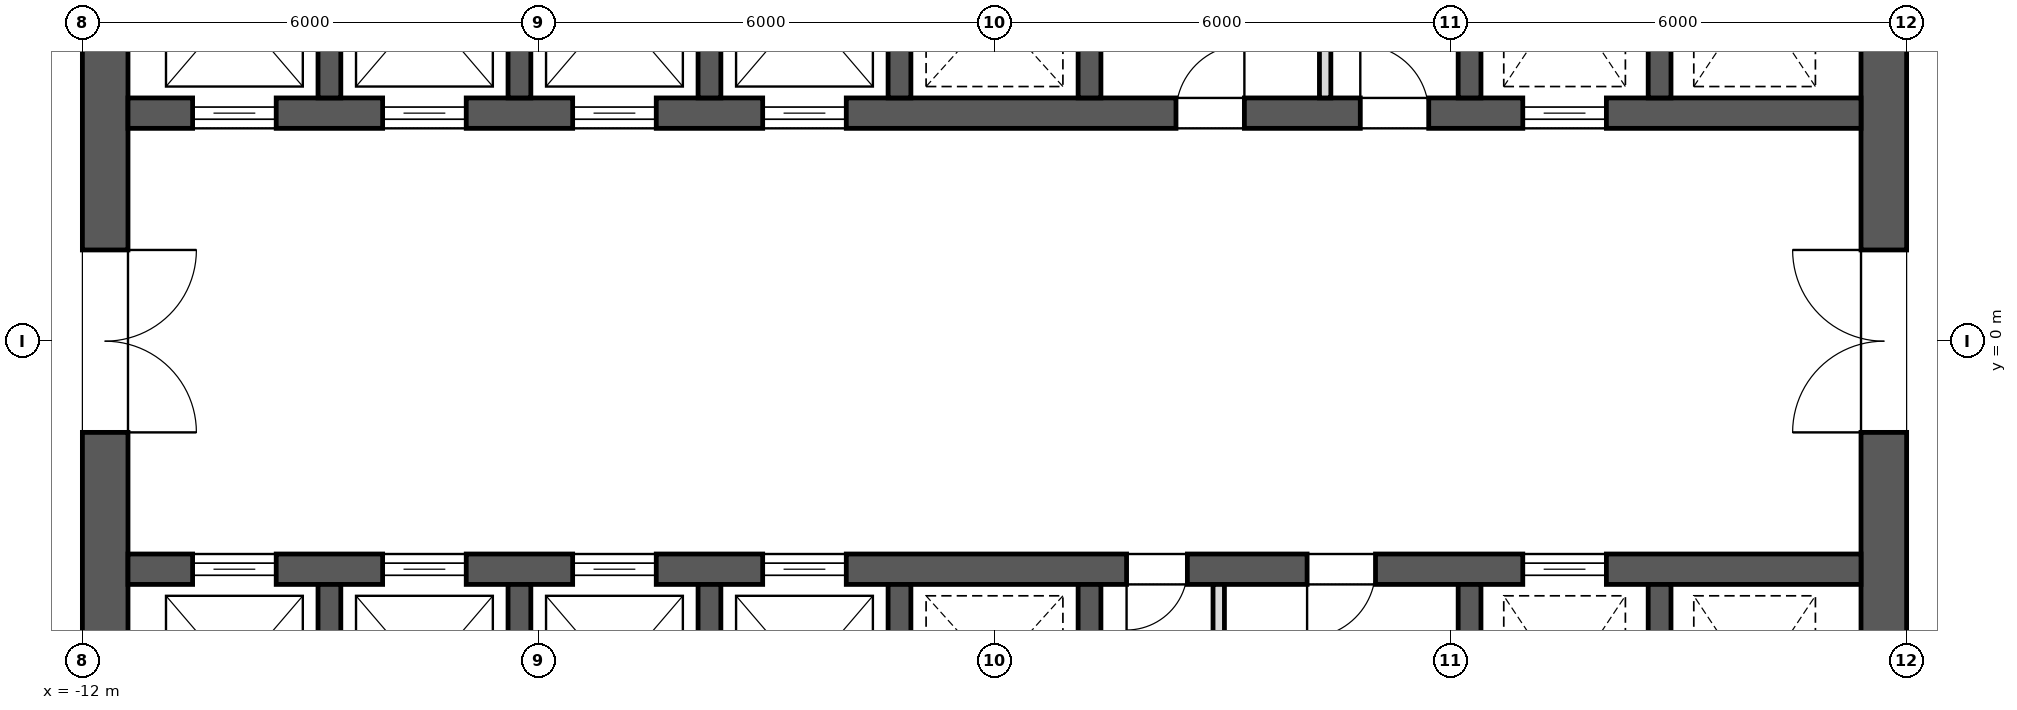
"""IFC4 building model, lengths in metres.
Left out: names, types, materials, properties, quantities, classifications, styles, units other than length and angle.
Written with IfcOpenShell. Run it as: python <this file> out.ifc"""

import sys

from ifc_helpers import new_model, si_unit, direction, frame, frame_2d, origin, place, context, subcontext, project, spatial, rectangle, extrude, element, fill, save


model = new_model("IFC4")
c1 = context("Model", 3, precision=1e-05, world=origin(), true_north=direction((0.0, 1.0)))
c2 = subcontext(c1, "Body", "Model", "MODEL_VIEW")
j1 = project(units=[si_unit("LENGTHUNIT", "METRE"), si_unit("PLANEANGLEUNIT", "RADIAN")], contexts=[c1])
p1 = place(None, origin())
s1 = spatial("IfcSite", under=j1, at=p1, CompositionType="ELEMENT")
p2 = place(p1, origin())
s2 = spatial("IfcBuilding", under=s1, at=p2, CompositionType="ELEMENT")
p3 = place(p2, frame((0.0, 0.0, 238.9)))
s3 = spatial("IfcBuildingStorey", under=s2, at=p3, CompositionType="ELEMENT", Elevation=238.9)
p4 = place(p3, frame((11.7, -11.4, 0.0), z_axis=(0.0, 0.0, 1.0), x_axis=(0.0, 1.0, 0.0)))
e1 = element("IfcWall", 1, at=p4, inside=s3, PredefinedType="SHEAR", context=c2, shape_type="SweptSolid", body=[
    extrude(rectangle(XDim=22.8, YDim=0.6, at=frame_2d((11.4, 0.0))), origin(), (0.0, 0.0, 1.0), 4.0),
])
p5 = place(p4, frame((10.2, 0.0, 0.0)))
e2 = element("IfcOpeningElement", 2, at=p5, cuts=e1, PredefinedType="OPENING", context=c2, shape_type="SweptSolid", body=[
    extrude(rectangle(XDim=2.4, YDim=2.1, at=frame_2d((1.2, 1.05))), frame((0.0, 0.312, 0.0), z_axis=(0.0, -1.0, 0.0), x_axis=(1.0, 0.0, 0.0)), (0.0, 0.0, 1.0), 0.624),
])
p6 = place(p4, frame((19.5, 0.0, 0.0)))
e3 = element("IfcOpeningElement", 3, at=p6, cuts=e1, PredefinedType="OPENING", context=c2, shape_type="SweptSolid", body=[
    extrude(rectangle(XDim=1.2, YDim=2.1, at=frame_2d((0.6, 1.05))), frame((0.0, 0.312, 0.0), z_axis=(0.0, -1.0, 0.0), x_axis=(1.0, 0.0, 0.0)), (0.0, 0.0, 1.0), 0.624),
])
p7 = place(p4, frame((2.1, 0.0, 0.0)))
e4 = element("IfcOpeningElement", 4, at=p7, cuts=e1, PredefinedType="OPENING", context=c2, shape_type="SweptSolid", body=[
    extrude(rectangle(XDim=1.2, YDim=2.1, at=frame_2d((0.6, 1.05))), frame((0.0, 0.312, 0.0), z_axis=(0.0, -1.0, 0.0), x_axis=(1.0, 0.0, 0.0)), (0.0, 0.0, 1.0), 0.624),
])
p8 = place(p3, frame((-11.7, -11.4, 0.0), z_axis=(0.0, 0.0, 1.0), x_axis=(0.0, 1.0, 0.0)))
e5 = element("IfcWall", 5, at=p8, inside=s3, PredefinedType="SHEAR", context=c2, shape_type="SweptSolid", body=[
    extrude(rectangle(XDim=22.8, YDim=0.6, at=frame_2d((11.4, 0.0))), origin(), (0.0, 0.0, 1.0), 4.0),
])
p9 = place(p8, frame((10.2, 0.0, 0.0)))
e6 = element("IfcOpeningElement", 6, at=p9, cuts=e5, PredefinedType="OPENING", context=c2, shape_type="SweptSolid", body=[
    extrude(rectangle(XDim=2.4, YDim=2.1, at=frame_2d((1.2, 1.05))), frame((0.0, 0.312, 0.0), z_axis=(0.0, -1.0, 0.0), x_axis=(1.0, 0.0, 0.0)), (0.0, 0.0, 1.0), 0.624),
])
p10 = place(p8, frame((18.925, 0.0, 0.0)))
e7 = element("IfcOpeningElement", 7, at=p10, cuts=e5, PredefinedType="OPENING", context=c2, shape_type="SweptSolid", body=[
    extrude(rectangle(XDim=1.2, YDim=2.1, at=frame_2d((0.6, 1.05))), frame((0.0, 0.312, 0.0), z_axis=(0.0, -1.0, 0.0), x_axis=(1.0, 0.0, 0.0)), (0.0, 0.0, 1.0), 0.624),
])
p11 = place(p8, frame((2.675, 0.0, 0.0)))
e8 = element("IfcOpeningElement", 8, at=p11, cuts=e5, PredefinedType="OPENING", context=c2, shape_type="SweptSolid", body=[
    extrude(rectangle(XDim=1.2, YDim=2.1, at=frame_2d((0.6, 1.05))), frame((0.0, 0.312, 0.0), z_axis=(0.0, -1.0, 0.0), x_axis=(1.0, 0.0, 0.0)), (0.0, 0.0, 1.0), 0.624),
])
p12 = place(p3, frame((-11.4, 3.0, 0.0), z_axis=(0.0, 0.0, 1.0), x_axis=(1.0, 0.0, 0.0)))
e9 = element("IfcWall", 9, at=p12, inside=s3, PredefinedType="SHEAR", context=c2, shape_type="SweptSolid", body=[
    extrude(rectangle(XDim=22.8, YDim=0.4, at=frame_2d((11.4, 0.0))), origin(), (0.0, 0.0, 1.0), 4.0),
])
p13 = place(p12, frame((0.85, 0.0, 0.0)))
e10 = element("IfcOpeningElement", 10, at=p13, cuts=e9, PredefinedType="OPENING", context=c2, shape_type="SweptSolid", body=[
    extrude(rectangle(XDim=1.1, YDim=2.1, at=frame_2d((0.55, 1.05))), frame((0.0, 0.212, 0.0), z_axis=(0.0, -1.0, 0.0), x_axis=(1.0, 0.0, 0.0)), (0.0, 0.0, 1.0), 0.424),
])
p14 = place(p12, frame((3.35, 0.0, 0.0)))
e11 = element("IfcOpeningElement", 11, at=p14, cuts=e9, PredefinedType="OPENING", context=c2, shape_type="SweptSolid", body=[
    extrude(rectangle(XDim=1.1, YDim=2.1, at=frame_2d((0.55, 1.05))), frame((0.0, 0.212, 0.0), z_axis=(0.0, -1.0, 0.0), x_axis=(1.0, 0.0, 0.0)), (0.0, 0.0, 1.0), 0.424),
])
p15 = place(p12, frame((5.85, 0.0, 0.0)))
e12 = element("IfcOpeningElement", 12, at=p15, cuts=e9, PredefinedType="OPENING", context=c2, shape_type="SweptSolid", body=[
    extrude(rectangle(XDim=1.1, YDim=2.1, at=frame_2d((0.55, 1.05))), frame((0.0, 0.212, 0.0), z_axis=(0.0, -1.0, 0.0), x_axis=(1.0, 0.0, 0.0)), (0.0, 0.0, 1.0), 0.424),
])
p16 = place(p12, frame((8.35, 0.0, 0.0)))
e13 = element("IfcOpeningElement", 13, at=p16, cuts=e9, PredefinedType="OPENING", context=c2, shape_type="SweptSolid", body=[
    extrude(rectangle(XDim=1.1, YDim=2.1, at=frame_2d((0.55, 1.05))), frame((0.0, 0.212, 0.0), z_axis=(0.0, -1.0, 0.0), x_axis=(1.0, 0.0, 0.0)), (0.0, 0.0, 1.0), 0.424),
])
p17 = place(p12, frame((18.35, 0.0, 0.0)))
e14 = element("IfcOpeningElement", 14, at=p17, cuts=e9, PredefinedType="OPENING", context=c2, shape_type="SweptSolid", body=[
    extrude(rectangle(XDim=1.1, YDim=2.1, at=frame_2d((0.55, 1.05))), frame((0.0, 0.212, 0.0), z_axis=(0.0, -1.0, 0.0), x_axis=(1.0, 0.0, 0.0)), (0.0, 0.0, 1.0), 0.424),
])
p18 = place(p12, frame((13.788, 0.0, 0.0)))
e15 = element("IfcOpeningElement", 15, at=p18, cuts=e9, PredefinedType="OPENING", context=c2, shape_type="SweptSolid", body=[
    extrude(rectangle(XDim=0.9, YDim=2.1, at=frame_2d((0.45, 1.05))), frame((0.0, 0.212, 0.0), z_axis=(0.0, -1.0, 0.0), x_axis=(1.0, 0.0, 0.0)), (0.0, 0.0, 1.0), 0.424),
])
p19 = place(p12, frame((16.212, 0.0, 0.0)))
e16 = element("IfcOpeningElement", 16, at=p19, cuts=e9, PredefinedType="OPENING", context=c2, shape_type="SweptSolid", body=[
    extrude(rectangle(XDim=0.9, YDim=2.1, at=frame_2d((0.45, 1.05))), frame((0.0, 0.212, 0.0), z_axis=(0.0, -1.0, 0.0), x_axis=(1.0, 0.0, 0.0)), (0.0, 0.0, 1.0), 0.424),
])
for number, where, z_axis, x_axis in (
    (17, (-8.75, 3.2, 0.0), (0.0, 0.0, 1.0), (0.0, 1.0, 0.0)),
    (18, (-6.25, 3.2, 0.0), (0.0, 0.0, 1.0), (0.0, 1.0, 0.0)),
    (19, (-3.75, 3.2, 0.0), (0.0, 0.0, 1.0), (0.0, 1.0, 0.0)),
    (20, (-1.25, 3.2, 0.0), (0.0, 0.0, 1.0), (0.0, 1.0, 0.0)),
    (21, (1.25, 3.2, 0.0), (0.0, 0.0, 1.0), (0.0, 1.0, 0.0)),
    (22, (6.25, 3.2, 0.0), (0.0, 0.0, 1.0), (0.0, 1.0, 0.0)),
    (23, (8.75, 3.2, 0.0), (0.0, 0.0, 1.0), (0.0, 1.0, 0.0)),
):
    element("IfcWall", number, at=place(p3, frame(where, z_axis=z_axis, x_axis=x_axis)), inside=s3, PredefinedType="SHEAR", context=c2, shape_type="SweptSolid", body=[
        extrude(rectangle(XDim=2.9, YDim=0.3, at=frame_2d((1.45, 0.0))), origin(), (0.0, 0.0, 1.0), 4.0),
    ])
p20 = place(p3, frame((-11.4, -3.0, 0.0), z_axis=(0.0, 0.0, 1.0), x_axis=(1.0, 0.0, 0.0)))
e24 = element("IfcWall", 24, at=p20, inside=s3, PredefinedType="SHEAR", context=c2, shape_type="SweptSolid", body=[
    extrude(rectangle(XDim=22.8, YDim=0.4, at=frame_2d((11.4, 0.0))), origin(), (0.0, 0.0, 1.0), 4.0),
])
p21 = place(p20, frame((0.85, 0.0, 0.0)))
e25 = element("IfcOpeningElement", 25, at=p21, cuts=e24, PredefinedType="OPENING", context=c2, shape_type="SweptSolid", body=[
    extrude(rectangle(XDim=1.1, YDim=2.1, at=frame_2d((0.55, 1.05))), frame((0.0, 0.212, 0.0), z_axis=(0.0, -1.0, 0.0), x_axis=(1.0, 0.0, 0.0)), (0.0, 0.0, 1.0), 0.424),
])
p22 = place(p20, frame((3.35, 0.0, 0.0)))
e26 = element("IfcOpeningElement", 26, at=p22, cuts=e24, PredefinedType="OPENING", context=c2, shape_type="SweptSolid", body=[
    extrude(rectangle(XDim=1.1, YDim=2.1, at=frame_2d((0.55, 1.05))), frame((0.0, 0.212, 0.0), z_axis=(0.0, -1.0, 0.0), x_axis=(1.0, 0.0, 0.0)), (0.0, 0.0, 1.0), 0.424),
])
p23 = place(p20, frame((5.85, 0.0, 0.0)))
e27 = element("IfcOpeningElement", 27, at=p23, cuts=e24, PredefinedType="OPENING", context=c2, shape_type="SweptSolid", body=[
    extrude(rectangle(XDim=1.1, YDim=2.1, at=frame_2d((0.55, 1.05))), frame((0.0, 0.212, 0.0), z_axis=(0.0, -1.0, 0.0), x_axis=(1.0, 0.0, 0.0)), (0.0, 0.0, 1.0), 0.424),
])
p24 = place(p20, frame((8.35, 0.0, 0.0)))
e28 = element("IfcOpeningElement", 28, at=p24, cuts=e24, PredefinedType="OPENING", context=c2, shape_type="SweptSolid", body=[
    extrude(rectangle(XDim=1.1, YDim=2.1, at=frame_2d((0.55, 1.05))), frame((0.0, 0.212, 0.0), z_axis=(0.0, -1.0, 0.0), x_axis=(1.0, 0.0, 0.0)), (0.0, 0.0, 1.0), 0.424),
])
p25 = place(p20, frame((18.35, 0.0, 0.0)))
e29 = element("IfcOpeningElement", 29, at=p25, cuts=e24, PredefinedType="OPENING", context=c2, shape_type="SweptSolid", body=[
    extrude(rectangle(XDim=1.1, YDim=2.1, at=frame_2d((0.55, 1.05))), frame((0.0, 0.212, 0.0), z_axis=(0.0, -1.0, 0.0), x_axis=(1.0, 0.0, 0.0)), (0.0, 0.0, 1.0), 0.424),
])
p26 = place(p20, frame((13.137, 0.0, 0.0)))
e30 = element("IfcOpeningElement", 30, at=p26, cuts=e24, PredefinedType="OPENING", context=c2, shape_type="SweptSolid", body=[
    extrude(rectangle(XDim=0.8, YDim=2.1, at=frame_2d((0.4, 1.05))), frame((0.0, 0.212, 0.0), z_axis=(0.0, -1.0, 0.0), x_axis=(1.0, 0.0, 0.0)), (0.0, 0.0, 1.0), 0.424),
])
p27 = place(p20, frame((15.512, 0.0, 0.0)))
e31 = element("IfcOpeningElement", 31, at=p27, cuts=e24, PredefinedType="OPENING", context=c2, shape_type="SweptSolid", body=[
    extrude(rectangle(XDim=0.9, YDim=2.1, at=frame_2d((0.45, 1.05))), frame((0.0, 0.212, 0.0), z_axis=(0.0, -1.0, 0.0), x_axis=(1.0, 0.0, 0.0)), (0.0, 0.0, 1.0), 0.424),
])
for number, where, z_axis, x_axis in (
    (32, (-8.75, -6.1, 0.0), (0.0, 0.0, 1.0), (0.0, 1.0, 0.0)),
    (33, (-6.25, -6.1, 0.0), (0.0, 0.0, 1.0), (0.0, 1.0, 0.0)),
    (34, (-3.75, -6.1, 0.0), (0.0, 0.0, 1.0), (0.0, 1.0, 0.0)),
    (35, (-1.25, -6.1, 0.0), (0.0, 0.0, 1.0), (0.0, 1.0, 0.0)),
    (36, (1.25, -6.1, 0.0), (0.0, 0.0, 1.0), (0.0, 1.0, 0.0)),
    (37, (6.25, -6.1, 0.0), (0.0, 0.0, 1.0), (0.0, 1.0, 0.0)),
    (38, (8.75, -6.1, 0.0), (0.0, 0.0, 1.0), (0.0, 1.0, 0.0)),
):
    element("IfcWall", number, at=place(p3, frame(where, z_axis=z_axis, x_axis=x_axis)), inside=s3, PredefinedType="SHEAR", context=c2, shape_type="SweptSolid", body=[
        extrude(rectangle(XDim=2.9, YDim=0.3, at=frame_2d((1.45, 0.0))), origin(), (0.0, 0.0, 1.0), 4.0),
    ])
for number, where, z_axis, x_axis in (
    (39, (4.35, 3.2, 0.0), (0.0, 0.0, 1.0), (0.0, 1.0, 0.0)),
    (40, (2.95, -6.1, 0.0), (0.0, 0.0, 1.0), (0.0, 1.0, 0.0)),
):
    element("IfcWall", number, at=place(p3, frame(where, z_axis=z_axis, x_axis=x_axis)), inside=s3, PredefinedType="PARTITIONING", context=c2, shape_type="SweptSolid", body=[
        extrude(rectangle(XDim=2.9, YDim=0.15, at=frame_2d((1.45, 0.0))), origin(), (0.0, 0.0, 1.0), 3.7),
    ])
p28 = place(p13, origin())
e41 = element("IfcDoor", 41, at=p28, inside=s3, OperationType="SLIDING_TO_LEFT", PredefinedType="DOOR", context=c2, shape_type="SweptSolid", body=[
    extrude(rectangle(XDim=1.1, YDim=2.1, at=frame_2d((0.55, 1.05))), frame((0.0, 0.025, 0.0), z_axis=(0.0, -1.0, 0.0), x_axis=(1.0, 0.0, 0.0)), (0.0, 0.0, 1.0), 0.05),
])
fill(e10, e41)
p29 = place(p14, origin())
e42 = element("IfcDoor", 42, at=p29, inside=s3, OperationType="SLIDING_TO_LEFT", PredefinedType="DOOR", context=c2, shape_type="SweptSolid", body=[
    extrude(rectangle(XDim=1.1, YDim=2.1, at=frame_2d((0.55, 1.05))), frame((0.0, 0.025, 0.0), z_axis=(0.0, -1.0, 0.0), x_axis=(1.0, 0.0, 0.0)), (0.0, 0.0, 1.0), 0.05),
])
fill(e11, e42)
p30 = place(p21, origin())
e43 = element("IfcDoor", 43, at=p30, inside=s3, OperationType="SLIDING_TO_LEFT", PredefinedType="DOOR", context=c2, shape_type="SweptSolid", body=[
    extrude(rectangle(XDim=1.1, YDim=2.1, at=frame_2d((0.55, 1.05))), frame((0.0, 0.025, 0.0), z_axis=(0.0, -1.0, 0.0), x_axis=(1.0, 0.0, 0.0)), (0.0, 0.0, 1.0), 0.05),
])
fill(e25, e43)
p31 = place(p22, origin())
e44 = element("IfcDoor", 44, at=p31, inside=s3, OperationType="SLIDING_TO_LEFT", PredefinedType="DOOR", context=c2, shape_type="SweptSolid", body=[
    extrude(rectangle(XDim=1.1, YDim=2.1, at=frame_2d((0.55, 1.05))), frame((0.0, 0.025, 0.0), z_axis=(0.0, -1.0, 0.0), x_axis=(1.0, 0.0, 0.0)), (0.0, 0.0, 1.0), 0.05),
])
fill(e26, e44)
p32 = place(p15, origin())
e45 = element("IfcDoor", 45, at=p32, inside=s3, OperationType="SLIDING_TO_LEFT", PredefinedType="DOOR", context=c2, shape_type="SweptSolid", body=[
    extrude(rectangle(XDim=1.1, YDim=2.1, at=frame_2d((0.55, 1.05))), frame((0.0, 0.025, 0.0), z_axis=(0.0, -1.0, 0.0), x_axis=(1.0, 0.0, 0.0)), (0.0, 0.0, 1.0), 0.05),
])
fill(e12, e45)
p33 = place(p16, origin())
e46 = element("IfcDoor", 46, at=p33, inside=s3, OperationType="SLIDING_TO_LEFT", PredefinedType="DOOR", context=c2, shape_type="SweptSolid", body=[
    extrude(rectangle(XDim=1.1, YDim=2.1, at=frame_2d((0.55, 1.05))), frame((0.0, 0.025, 0.0), z_axis=(0.0, -1.0, 0.0), x_axis=(1.0, 0.0, 0.0)), (0.0, 0.0, 1.0), 0.05),
])
fill(e13, e46)
p34 = place(p23, origin())
e47 = element("IfcDoor", 47, at=p34, inside=s3, OperationType="SLIDING_TO_LEFT", PredefinedType="DOOR", context=c2, shape_type="SweptSolid", body=[
    extrude(rectangle(XDim=1.1, YDim=2.1, at=frame_2d((0.55, 1.05))), frame((0.0, 0.025, 0.0), z_axis=(0.0, -1.0, 0.0), x_axis=(1.0, 0.0, 0.0)), (0.0, 0.0, 1.0), 0.05),
])
fill(e27, e47)
p35 = place(p24, origin())
e48 = element("IfcDoor", 48, at=p35, inside=s3, OperationType="SLIDING_TO_LEFT", PredefinedType="DOOR", context=c2, shape_type="SweptSolid", body=[
    extrude(rectangle(XDim=1.1, YDim=2.1, at=frame_2d((0.55, 1.05))), frame((0.0, 0.025, 0.0), z_axis=(0.0, -1.0, 0.0), x_axis=(1.0, 0.0, 0.0)), (0.0, 0.0, 1.0), 0.05),
])
fill(e28, e48)
p36 = place(p17, origin())
e49 = element("IfcDoor", 49, at=p36, inside=s3, OperationType="SLIDING_TO_LEFT", PredefinedType="DOOR", context=c2, shape_type="SweptSolid", body=[
    extrude(rectangle(XDim=1.1, YDim=2.1, at=frame_2d((0.55, 1.05))), frame((0.0, 0.025, 0.0), z_axis=(0.0, -1.0, 0.0), x_axis=(1.0, 0.0, 0.0)), (0.0, 0.0, 1.0), 0.05),
])
fill(e14, e49)
p37 = place(p25, origin())
e50 = element("IfcDoor", 50, at=p37, inside=s3, OperationType="SLIDING_TO_LEFT", PredefinedType="DOOR", context=c2, shape_type="SweptSolid", body=[
    extrude(rectangle(XDim=1.1, YDim=2.1, at=frame_2d((0.55, 1.05))), frame((0.0, 0.025, 0.0), z_axis=(0.0, -1.0, 0.0), x_axis=(1.0, 0.0, 0.0)), (0.0, 0.0, 1.0), 0.05),
])
fill(e29, e50)
p38 = place(p9, frame((2.4, 0.0, 0.0), z_axis=(0.0, 0.0, 1.0), x_axis=(-1.0, 0.0, 0.0)))
e51 = element("IfcDoor", 51, at=p38, inside=s3, OperationType="DOUBLE_DOOR_SINGLE_SWING", PredefinedType="DOOR", context=c2, shape_type="SweptSolid", body=[
    extrude(rectangle(XDim=2.4, YDim=2.1, at=frame_2d((1.2, 1.05))), frame((0.0, 0.025, 0.0), z_axis=(0.0, -1.0, 0.0), x_axis=(1.0, 0.0, 0.0)), (0.0, 0.0, 1.0), 0.05),
])
fill(e6, e51)
p39 = place(p5, origin())
e52 = element("IfcDoor", 52, at=p39, inside=s3, OperationType="DOUBLE_DOOR_SINGLE_SWING", PredefinedType="DOOR", context=c2, shape_type="SweptSolid", body=[
    extrude(rectangle(XDim=2.4, YDim=2.1, at=frame_2d((1.2, 1.05))), frame((0.0, 0.025, 0.0), z_axis=(0.0, -1.0, 0.0), x_axis=(1.0, 0.0, 0.0)), (0.0, 0.0, 1.0), 0.05),
])
fill(e2, e52)
p40 = place(p18, origin())
e53 = element("IfcDoor", 53, at=p40, inside=s3, OperationType="SINGLE_SWING_LEFT", PredefinedType="DOOR", context=c2, shape_type="SweptSolid", body=[
    extrude(rectangle(XDim=0.9, YDim=2.1, at=frame_2d((0.45, 1.05))), frame((0.0, 0.025, 0.0), z_axis=(0.0, -1.0, 0.0), x_axis=(1.0, 0.0, 0.0)), (0.0, 0.0, 1.0), 0.05),
])
fill(e15, e53)
p41 = place(p19, origin())
e54 = element("IfcDoor", 54, at=p41, inside=s3, OperationType="SINGLE_SWING_RIGHT", PredefinedType="DOOR", context=c2, shape_type="SweptSolid", body=[
    extrude(rectangle(XDim=0.9, YDim=2.1, at=frame_2d((0.45, 1.05))), frame((0.0, 0.025, 0.0), z_axis=(0.0, -1.0, 0.0), x_axis=(1.0, 0.0, 0.0)), (0.0, 0.0, 1.0), 0.05),
])
fill(e16, e54)
p42 = place(p26, frame((0.8, 0.0, 0.0), z_axis=(0.0, 0.0, 1.0), x_axis=(-1.0, 0.0, 0.0)))
e55 = element("IfcDoor", 55, at=p42, inside=s3, OperationType="SINGLE_SWING_LEFT", PredefinedType="DOOR", context=c2, shape_type="SweptSolid", body=[
    extrude(rectangle(XDim=0.8, YDim=2.1, at=frame_2d((0.4, 1.05))), frame((0.0, 0.025, 0.0), z_axis=(0.0, -1.0, 0.0), x_axis=(1.0, 0.0, 0.0)), (0.0, 0.0, 1.0), 0.05),
])
fill(e30, e55)
p43 = place(p27, frame((0.9, 0.0, 0.0), z_axis=(0.0, 0.0, 1.0), x_axis=(-1.0, 0.0, 0.0)))
e56 = element("IfcDoor", 56, at=p43, inside=s3, OperationType="SINGLE_SWING_LEFT", PredefinedType="DOOR", context=c2, shape_type="SweptSolid", body=[
    extrude(rectangle(XDim=0.9, YDim=2.1, at=frame_2d((0.45, 1.05))), frame((0.0, 0.025, 0.0), z_axis=(0.0, -1.0, 0.0), x_axis=(1.0, 0.0, 0.0)), (0.0, 0.0, 1.0), 0.05),
])
fill(e31, e56)
save(model, sys.argv[1])
